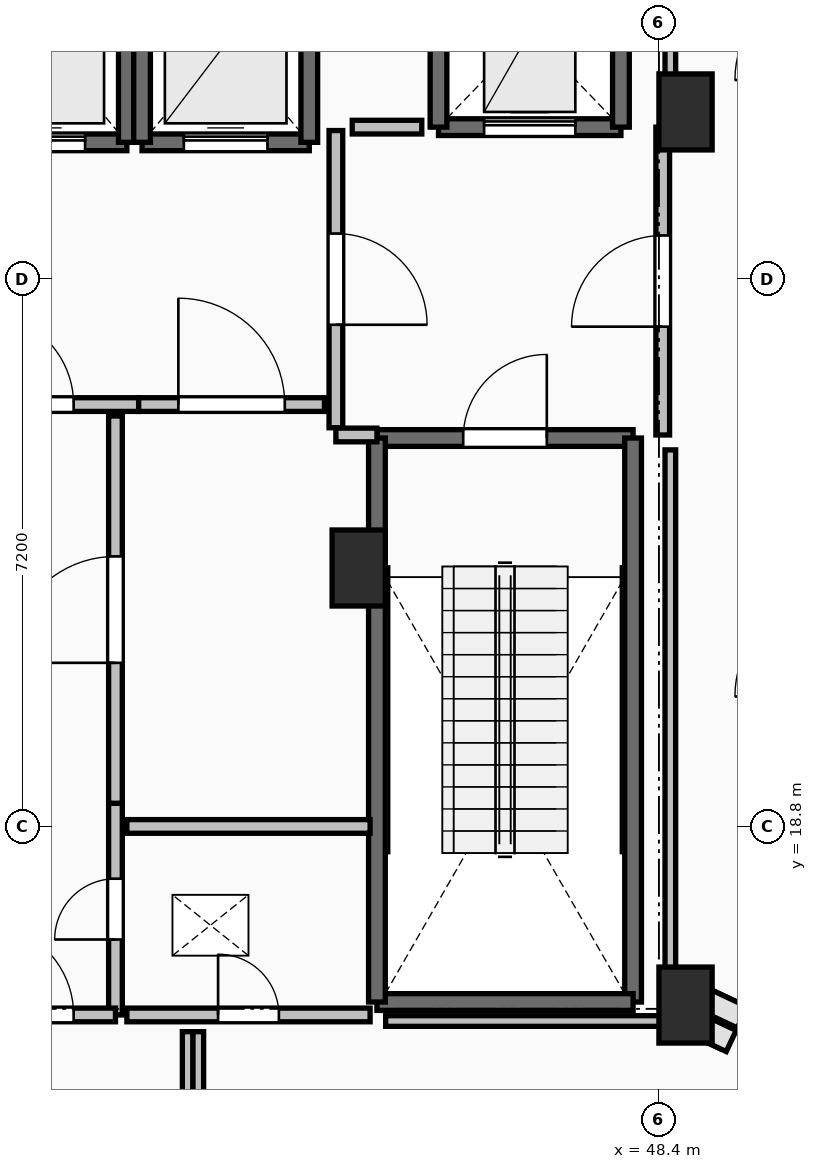
"""IFC4 building model, lengths in metres.
Left out: names, types, materials, properties, quantities, classifications, styles, units other than length and angle.
Written with IfcOpenShell. Run it as: python <this file> out.ifc"""

import sys

from ifc_helpers import new_model, si_unit, direction, frame, frame_2d, origin, origin_2d, place, context, subcontext, project, spatial, rectangle, extrude, element, fill, save


model = new_model("IFC4")
c1 = context("Model", 3, precision=1e-05, world=origin(), true_north=direction((0.0, 1.0)))
c2 = subcontext(c1, "Body", "Model", "MODEL_VIEW")
j1 = project(units=[si_unit("LENGTHUNIT", "METRE"), si_unit("PLANEANGLEUNIT", "RADIAN")], contexts=[c1])
p1 = place(None, origin())
s1 = spatial("IfcSite", under=j1, at=p1, CompositionType="ELEMENT")
p2 = place(p1, origin())
s2 = spatial("IfcBuilding", under=s1, at=p2, CompositionType="ELEMENT")
p3 = place(p2, frame((0.0, 0.0, 224.95)))
s3 = spatial("IfcBuildingStorey", under=s2, at=p3, CompositionType="ELEMENT", Elevation=224.95)
for number, where, z_axis, x_axis in (
    (1, (48.75, 28.2, 0.0), (0.0, 0.0, 1.0), (1.0, 0.0, 0.0)),
    (2, (48.75, 16.45, 0.0), (0.0, 0.0, 1.0), (1.0, 0.0, 0.0)),
    (3, (44.45, 22.2, 0.0), (0.0, 0.0, 1.0), (1.0, 0.0, 0.0)),
):
    element("IfcColumn", number, at=place(p3, frame(where, z_axis=z_axis, x_axis=x_axis)), inside=s3, PredefinedType="PILASTER", context=c2, shape_type="SweptSolid", body=[
        extrude(rectangle(XDim=0.7, YDim=1.0, at=origin_2d()), origin(), (0.0, 0.0, 1.0), 4.8),
    ])
p4 = place(p3, frame((44.69, 23.91, 0.0), z_axis=(0.0, 0.0, 1.0), x_axis=(1.0, 0.0, 0.0)))
e4 = element("IfcWall", 4, at=p4, inside=s3, PredefinedType="SOLIDWALL", context=c2, shape_type="SweptSolid", body=[
    extrude(rectangle(XDim=3.37, YDim=0.22, at=frame_2d((1.685, 0.0))), origin(), (0.0, 0.0, 1.0), 4.5),
])
p5 = place(p4, frame((1.135, 0.0, 0.0)))
e5 = element("IfcOpeningElement", 5, at=p5, cuts=e4, PredefinedType="OPENING", context=c2, shape_type="SweptSolid", body=[
    extrude(rectangle(XDim=1.1, YDim=2.15, at=frame_2d((0.55, 1.075))), frame((0.0, 0.125, 0.0), z_axis=(0.0, -1.0, 0.0), x_axis=(1.0, 0.0, 0.0)), (0.0, 0.0, 1.0), 0.25),
])
p6 = place(p3, frame((48.06, 23.91, 0.0), z_axis=(0.0, 0.0, 1.0), x_axis=(0.0, -1.0, 0.0)))
e6 = element("IfcWall", 6, at=p6, inside=s3, PredefinedType="SOLIDWALL", context=c2, shape_type="SweptSolid", body=[
    extrude(rectangle(XDim=7.42, YDim=0.22, at=frame_2d((3.71, 0.0))), origin(), (0.0, 0.0, 1.0), 4.5),
])
p7 = place(p3, frame((48.06, 16.49, 0.0), z_axis=(0.0, 0.0, 1.0), x_axis=(-1.0, 0.0, 0.0)))
e7 = element("IfcWall", 7, at=p7, inside=s3, PredefinedType="SOLIDWALL", context=c2, shape_type="SweptSolid", body=[
    extrude(rectangle(XDim=3.37, YDim=0.22, at=frame_2d((1.685, 0.0))), origin(), (0.0, 0.0, 1.0), 4.5),
])
p8 = place(p3, frame((44.69, 16.49, 0.0), z_axis=(0.0, 0.0, 1.0), x_axis=(0.0, 1.0, 0.0)))
e8 = element("IfcWall", 8, at=p8, inside=s3, PredefinedType="SOLIDWALL", context=c2, shape_type="SweptSolid", body=[
    extrude(rectangle(XDim=7.42, YDim=0.22, at=frame_2d((3.71, 0.0))), origin(), (0.0, 0.0, 1.0), 4.5),
])
p9 = place(p3, frame((39.2, 27.8, 0.0), z_axis=(0.0, 0.0, 1.0), x_axis=(1.0, 0.0, 0.0)))
e9 = element("IfcWall", 9, at=p9, inside=s3, PredefinedType="SOLIDWALL", context=c2, shape_type="SweptSolid", body=[
    extrude(rectangle(XDim=2.2, YDim=0.22, at=frame_2d((1.1, 0.0))), origin(), (0.0, 0.0, 1.0), 4.5),
])
p10 = place(p9, frame((0.55, 0.0, 0.0)))
e10 = element("IfcOpeningElement", 10, at=p10, cuts=e9, PredefinedType="OPENING", context=c2, shape_type="SweptSolid", body=[
    extrude(rectangle(XDim=1.1, YDim=2.2, at=frame_2d((0.55, 1.1))), frame((0.0, 0.125, 0.0), z_axis=(0.0, -1.0, 0.0), x_axis=(1.0, 0.0, 0.0)), (0.0, 0.0, 1.0), 0.25),
])
p11 = place(p3, frame((41.4, 27.8, 0.0), z_axis=(0.0, 0.0, 1.0), x_axis=(0.0, 1.0, 0.0)))
e11 = element("IfcWall", 11, at=p11, inside=s3, PredefinedType="SOLIDWALL", context=c2, shape_type="SweptSolid", body=[
    extrude(rectangle(XDim=2.6, YDim=0.22, at=frame_2d((1.3, 0.0))), origin(), (0.0, 0.0, 1.0), 4.5),
])
p12 = place(p3, frame((41.6, 27.8, 0.0), z_axis=(0.0, 0.0, 1.0), x_axis=(1.0, 0.0, 0.0)))
e12 = element("IfcWall", 12, at=p12, inside=s3, PredefinedType="SOLIDWALL", context=c2, shape_type="SweptSolid", body=[
    extrude(rectangle(XDim=2.2, YDim=0.22, at=frame_2d((1.1, 0.0))), origin(), (0.0, 0.0, 1.0), 4.5),
])
p13 = place(p12, frame((0.55, 0.0, 0.0)))
e13 = element("IfcOpeningElement", 13, at=p13, cuts=e12, PredefinedType="OPENING", context=c2, shape_type="SweptSolid", body=[
    extrude(rectangle(XDim=1.1, YDim=2.2, at=frame_2d((0.55, 1.1))), frame((0.0, 0.125, 0.0), z_axis=(0.0, -1.0, 0.0), x_axis=(1.0, 0.0, 0.0)), (0.0, 0.0, 1.0), 0.25),
])
for number, where, z_axis, x_axis in (
    (14, (43.8, 27.8, 0.0), (0.0, 0.0, 1.0), (0.0, 1.0, 0.0)),
    (15, (41.6, 30.4, 0.0), (0.0, 0.0, 1.0), (0.0, -1.0, 0.0)),
):
    element("IfcWall", number, at=place(p3, frame(where, z_axis=z_axis, x_axis=x_axis)), inside=s3, PredefinedType="SOLIDWALL", context=c2, shape_type="SweptSolid", body=[
        extrude(rectangle(XDim=2.6, YDim=0.22, at=frame_2d((1.3, 0.0))), origin(), (0.0, 0.0, 1.0), 4.5),
    ])
p14 = place(p3, frame((45.5, 28.0, 0.0), z_axis=(0.0, 0.0, 1.0), x_axis=(1.0, 0.0, 0.0)))
e16 = element("IfcWall", 16, at=p14, inside=s3, PredefinedType="SHEAR", context=c2, shape_type="SweptSolid", body=[
    extrude(rectangle(XDim=2.4, YDim=0.22, at=frame_2d((1.2, 0.0))), origin(), (0.0, 0.0, 1.0), 4.5),
])
p15 = place(p14, frame((0.6, 0.0, 0.0)))
e17 = element("IfcOpeningElement", 17, at=p15, cuts=e16, PredefinedType="OPENING", context=c2, shape_type="SweptSolid", body=[
    extrude(rectangle(XDim=1.2, YDim=2.2, at=frame_2d((0.6, 1.1))), frame((0.0, 0.125, 0.0), z_axis=(0.0, -1.0, 0.0), x_axis=(1.0, 0.0, 0.0)), (0.0, 0.0, 1.0), 0.25),
])
for number, where, z_axis, x_axis in (
    (18, (47.9, 28.0, 0.0), (0.0, 0.0, 1.0), (0.0, 1.0, 0.0)),
    (19, (45.5, 30.5, 0.0), (0.0, 0.0, 1.0), (0.0, -1.0, 0.0)),
):
    element("IfcWall", number, at=place(p3, frame(where, z_axis=z_axis, x_axis=x_axis)), inside=s3, PredefinedType="SHEAR", context=c2, shape_type="SweptSolid", body=[
        extrude(rectangle(XDim=2.5, YDim=0.22, at=frame_2d((1.25, 0.0))), origin(), (0.0, 0.0, 1.0), 4.5),
    ])
p16 = place(p3, frame((44.15, 27.955, 0.0), z_axis=(0.0, 0.0, 1.0), x_axis=(0.0, -1.0, 0.0)))
e20 = element("IfcWall", 20, at=p16, inside=s3, PredefinedType="PARTITIONING", context=c2, shape_type="SweptSolid", body=[
    extrude(rectangle(XDim=3.91, YDim=0.18, at=frame_2d((1.955, 0.0))), origin(), (0.0, 0.0, 1.0), 4.5),
])
p17 = place(p16, frame((1.355, 0.0, 0.0)))
e21 = element("IfcOpeningElement", 21, at=p17, cuts=e20, PredefinedType="OPENING", context=c2, shape_type="SweptSolid", body=[
    extrude(rectangle(XDim=1.2, YDim=2.15, at=frame_2d((0.6, 1.075))), frame((0.0, 0.105, 0.0), z_axis=(0.0, -1.0, 0.0), x_axis=(1.0, 0.0, 0.0)), (0.0, 0.0, 1.0), 0.21),
])
p18 = place(p3, frame((44.15, 23.95, 0.0), z_axis=(0.0, 0.0, 1.0), x_axis=(1.0, 0.0, 0.0)))
e22 = element("IfcWall", 22, at=p18, inside=s3, PredefinedType="PARTITIONING", context=c2, shape_type="SweptSolid", body=[
    extrude(rectangle(XDim=0.54, YDim=0.18, at=frame_2d((0.27, 0.0))), origin(), (0.0, 0.0, 1.0), 4.5),
])
p19 = place(p3, frame((48.45, 23.95, 0.0), z_axis=(0.0, 0.0, 1.0), x_axis=(0.0, 1.0, 0.0)))
e23 = element("IfcWall", 23, at=p19, inside=s3, PredefinedType="PARTITIONING", context=c2, shape_type="SweptSolid", body=[
    extrude(rectangle(XDim=4.05, YDim=0.18, at=frame_2d((2.025, 0.0))), origin(), (0.0, 0.0, 1.0), 3.482),
])
p20 = place(p19, frame((1.425, 0.0, 0.0)))
e24 = element("IfcOpeningElement", 24, at=p20, cuts=e23, PredefinedType="OPENING", context=c2, shape_type="SweptSolid", body=[
    extrude(rectangle(XDim=1.2, YDim=2.15, at=frame_2d((0.6, 1.075))), frame((0.0, 0.105, 0.0), z_axis=(0.0, -1.0, 0.0), x_axis=(1.0, 0.0, 0.0)), (0.0, 0.0, 1.0), 0.21),
])
p21 = place(p3, frame((38.645, 24.35, 0.0), z_axis=(0.0, 0.0, 1.0), x_axis=(1.0, 0.0, 0.0)))
e25 = element("IfcWall", 25, at=p21, inside=s3, PredefinedType="PARTITIONING", context=c2, shape_type="SweptSolid", body=[
    extrude(rectangle(XDim=2.91, YDim=0.18, at=frame_2d((1.455, 0.0))), origin(), (0.0, 0.0, 1.0), 4.5),
])
p22 = place(p21, frame((0.855, 0.0, 0.0)))
e26 = element("IfcOpeningElement", 26, at=p22, cuts=e25, PredefinedType="OPENING", context=c2, shape_type="SweptSolid", body=[
    extrude(rectangle(XDim=1.2, YDim=2.15, at=frame_2d((0.6, 1.075))), frame((0.0, 0.105, 0.0), z_axis=(0.0, -1.0, 0.0), x_axis=(1.0, 0.0, 0.0)), (0.0, 0.0, 1.0), 0.21),
])
p23 = place(p3, frame((41.555, 24.35, 0.0), z_axis=(0.0, 0.0, 1.0), x_axis=(1.0, 0.0, 0.0)))
e27 = element("IfcWall", 27, at=p23, inside=s3, PredefinedType="PARTITIONING", context=c2, shape_type="SweptSolid", body=[
    extrude(rectangle(XDim=2.445, YDim=0.18, at=frame_2d((1.223, 0.0))), origin(), (0.0, 0.0, 1.0), 4.5),
])
p24 = place(p23, frame((0.522, 0.0, 0.0)))
e28 = element("IfcOpeningElement", 28, at=p24, cuts=e27, PredefinedType="OPENING", context=c2, shape_type="SweptSolid", body=[
    extrude(rectangle(XDim=1.4, YDim=2.2, at=frame_2d((0.7, 1.1))), frame((0.0, 0.105, 0.0), z_axis=(0.0, -1.0, 0.0), x_axis=(1.0, 0.0, 0.0)), (0.0, 0.0, 1.0), 0.21),
])
p25 = place(p3, frame((41.25, 16.32, 0.0), z_axis=(0.0, 0.0, 1.0), x_axis=(0.0, 1.0, 0.0)))
e29 = element("IfcWall", 29, at=p25, inside=s3, PredefinedType="PARTITIONING", context=c2, shape_type="SweptSolid", body=[
    extrude(rectangle(XDim=2.785, YDim=0.18, at=frame_2d((1.393, 0.0))), origin(), (0.0, 0.0, 1.0), 4.5),
])
p26 = place(p25, frame((0.992, 0.0, 0.0)))
e30 = element("IfcOpeningElement", 30, at=p26, cuts=e29, PredefinedType="OPENING", context=c2, shape_type="SweptSolid", body=[
    extrude(rectangle(XDim=0.8, YDim=2.05, at=frame_2d((0.4, 1.025))), frame((0.0, 0.105, 0.0), z_axis=(0.0, -1.0, 0.0), x_axis=(1.0, 0.0, 0.0)), (0.0, 0.0, 1.0), 0.21),
])
p27 = place(p3, frame((41.25, 19.105, 0.0), z_axis=(0.0, 0.0, 1.0), x_axis=(0.0, 1.0, 0.0)))
e31 = element("IfcWall", 31, at=p27, inside=s3, PredefinedType="PARTITIONING", context=c2, shape_type="SweptSolid", body=[
    extrude(rectangle(XDim=5.095, YDim=0.18, at=frame_2d((2.547, 0.0))), origin(), (0.0, 0.0, 1.0), 3.482),
])
p28 = place(p27, frame((1.847, 0.0, 0.0)))
e32 = element("IfcOpeningElement", 32, at=p28, cuts=e31, PredefinedType="OPENING", context=c2, shape_type="SweptSolid", body=[
    extrude(rectangle(XDim=1.4, YDim=2.2, at=frame_2d((0.7, 1.1))), frame((0.0, 0.105, 0.0), z_axis=(0.0, -1.0, 0.0), x_axis=(1.0, 0.0, 0.0)), (0.0, 0.0, 1.0), 0.21),
])
p29 = place(p3, frame((38.95, 16.32, 0.0), z_axis=(0.0, 0.0, 1.0), x_axis=(1.0, 0.0, 0.0)))
e33 = element("IfcWall", 33, at=p29, inside=s3, PredefinedType="PARTITIONING", context=c2, shape_type="SweptSolid", body=[
    extrude(rectangle(XDim=2.3, YDim=0.18, at=frame_2d((1.15, 0.0))), origin(), (0.0, 0.0, 1.0), 4.5),
])
p30 = place(p29, frame((0.55, 0.0, 0.0)))
e34 = element("IfcOpeningElement", 34, at=p30, cuts=e33, PredefinedType="OPENING", context=c2, shape_type="SweptSolid", body=[
    extrude(rectangle(XDim=1.2, YDim=2.15, at=frame_2d((0.6, 1.075))), frame((0.0, 0.105, 0.0), z_axis=(0.0, -1.0, 0.0), x_axis=(1.0, 0.0, 0.0)), (0.0, 0.0, 1.0), 0.21),
])
p31 = place(p3, frame((44.6, 18.8, 0.0), z_axis=(0.0, 0.0, 1.0), x_axis=(-1.0, 0.0, 0.0)))
e35 = element("IfcWall", 35, at=p31, inside=s3, PredefinedType="PARTITIONING", context=c2, shape_type="SweptSolid", body=[
    extrude(rectangle(XDim=3.2, YDim=0.18, at=frame_2d((1.6, 0.0))), origin(), (0.0, 0.0, 1.0), 4.5),
])
p32 = place(p3, frame((41.4, 16.32, 0.0), z_axis=(0.0, 0.0, 1.0), x_axis=(1.0, 0.0, 0.0)))
e36 = element("IfcWall", 36, at=p32, inside=s3, PredefinedType="PARTITIONING", context=c2, shape_type="SweptSolid", body=[
    extrude(rectangle(XDim=3.2, YDim=0.18, at=frame_2d((1.6, 0.0))), origin(), (0.0, 0.0, 1.0), 4.5),
])
p33 = place(p32, frame((1.2, 0.0, 0.0)))
e37 = element("IfcOpeningElement", 37, at=p33, cuts=e36, PredefinedType="OPENING", context=c2, shape_type="SweptSolid", body=[
    extrude(rectangle(XDim=0.8, YDim=2.05, at=frame_2d((0.4, 1.025))), frame((0.0, 0.105, 0.0), z_axis=(0.0, -1.0, 0.0), x_axis=(1.0, 0.0, 0.0)), (0.0, 0.0, 1.0), 0.21),
])
p34 = place(p3, frame((45.28, 28.0, 0.0), z_axis=(0.0, 0.0, 1.0), x_axis=(-1.0, 0.0, 0.0)))
e38 = element("IfcWall", 38, at=p34, inside=s3, PredefinedType="PARTITIONING", context=c2, shape_type="SweptSolid", body=[
    extrude(rectangle(XDim=0.915, YDim=0.18, at=frame_2d((0.458, 0.0))), origin(), (0.0, 0.0, 1.0), 4.5),
])
for number, where, z_axis, x_axis in (
    (39, (42.2, 16.1, 0.0), (0.0, 0.0, 1.0), (0.0, -1.0, 0.0)),
    (40, (42.34, 14.27, 0.0), (0.0, 0.0, 1.0), (0.0, 1.0, 0.0)),
):
    element("IfcWall", number, at=place(p3, frame(where, z_axis=z_axis, x_axis=x_axis)), inside=s3, PredefinedType="PARTITIONING", context=c2, shape_type="SweptSolid", body=[
        extrude(rectangle(XDim=1.83, YDim=0.14, at=frame_2d((0.915, 0.0))), origin(), (0.0, 0.0, 1.0), 4.5),
    ])
p35 = place(p3, frame((44.805, 16.24, 0.0), z_axis=(0.0, 0.0, 1.0), x_axis=(1.0, 0.0, 0.0)))
e41 = element("IfcWall", 41, at=p35, inside=s3, PredefinedType="PARTITIONING", context=c2, shape_type="SweptSolid", body=[
    extrude(rectangle(XDim=3.745, YDim=0.14, at=frame_2d((1.873, 0.0))), origin(), (0.0, 0.0, 1.0), 3.482),
])
p36 = place(p3, frame((48.55, 16.24, 0.0), z_axis=(0.0, 0.0, 1.0), x_axis=(0.0, 1.0, 0.0)))
e42 = element("IfcWall", 42, at=p36, inside=s3, PredefinedType="PARTITIONING", context=c2, shape_type="SweptSolid", body=[
    extrude(rectangle(XDim=7.514, YDim=0.14, at=frame_2d((3.757, 0.0))), origin(), (0.0, 0.0, 1.0), 3.482),
])
p37 = place(p3, frame((48.55, 28.196, 0.0), z_axis=(0.0, 0.0, 1.0), x_axis=(0.0, 1.0, 0.0)))
e43 = element("IfcWall", 43, at=p37, inside=s3, PredefinedType="PARTITIONING", context=c2, shape_type="SweptSolid", body=[
    extrude(rectangle(XDim=5.254, YDim=0.14, at=frame_2d((2.627, 0.0))), origin(), (0.0, 0.0, 1.0), 3.482),
])
p38 = place(p5, origin())
e44 = element("IfcDoor", 44, at=p38, inside=s3, OperationType="SINGLE_SWING_RIGHT", PredefinedType="DOOR", context=c2, shape_type="SweptSolid", body=[
    extrude(rectangle(XDim=1.1, YDim=2.15, at=frame_2d((0.55, 1.075))), frame((0.0, 0.025, 0.0), z_axis=(0.0, -1.0, 0.0), x_axis=(1.0, 0.0, 0.0)), (0.0, 0.0, 1.0), 0.05),
])
fill(e5, e44)
p39 = place(p10, origin())
e45 = element("IfcDoor", 45, at=p39, inside=s3, OperationType="SLIDING_TO_LEFT", PredefinedType="DOOR", context=c2, shape_type="SweptSolid", body=[
    extrude(rectangle(XDim=1.1, YDim=2.2, at=frame_2d((0.55, 1.1))), frame((0.0, 0.025, 0.0), z_axis=(0.0, -1.0, 0.0), x_axis=(1.0, 0.0, 0.0)), (0.0, 0.0, 1.0), 0.05),
])
fill(e10, e45)
p40 = place(p13, origin())
e46 = element("IfcDoor", 46, at=p40, inside=s3, OperationType="SLIDING_TO_LEFT", PredefinedType="DOOR", context=c2, shape_type="SweptSolid", body=[
    extrude(rectangle(XDim=1.1, YDim=2.2, at=frame_2d((0.55, 1.1))), frame((0.0, 0.025, 0.0), z_axis=(0.0, -1.0, 0.0), x_axis=(1.0, 0.0, 0.0)), (0.0, 0.0, 1.0), 0.05),
])
fill(e13, e46)
p41 = place(p15, origin())
e47 = element("IfcDoor", 47, at=p41, inside=s3, OperationType="SLIDING_TO_LEFT", PredefinedType="DOOR", context=c2, shape_type="SweptSolid", body=[
    extrude(rectangle(XDim=1.2, YDim=2.2, at=frame_2d((0.6, 1.1))), frame((0.0, 0.025, 0.0), z_axis=(0.0, -1.0, 0.0), x_axis=(1.0, 0.0, 0.0)), (0.0, 0.0, 1.0), 0.05),
])
fill(e17, e47)
p42 = place(p17, origin())
e48 = element("IfcDoor", 48, at=p42, inside=s3, OperationType="SINGLE_SWING_RIGHT", PredefinedType="DOOR", context=c2, shape_type="SweptSolid", body=[
    extrude(rectangle(XDim=1.2, YDim=2.15, at=frame_2d((0.6, 1.075))), frame((0.0, 0.025, 0.0), z_axis=(0.0, -1.0, 0.0), x_axis=(1.0, 0.0, 0.0)), (0.0, 0.0, 1.0), 0.05),
])
fill(e21, e48)
p43 = place(p20, origin())
e49 = element("IfcDoor", 49, at=p43, inside=s3, OperationType="SINGLE_SWING_LEFT", PredefinedType="DOOR", context=c2, shape_type="SweptSolid", body=[
    extrude(rectangle(XDim=1.2, YDim=2.15, at=frame_2d((0.6, 1.075))), frame((0.0, 0.025, 0.0), z_axis=(0.0, -1.0, 0.0), x_axis=(1.0, 0.0, 0.0)), (0.0, 0.0, 1.0), 0.05),
])
fill(e24, e49)
p44 = place(p22, origin())
e50 = element("IfcDoor", 50, at=p44, inside=s3, OperationType="SINGLE_SWING_LEFT", PredefinedType="DOOR", context=c2, shape_type="SweptSolid", body=[
    extrude(rectangle(XDim=1.2, YDim=2.15, at=frame_2d((0.6, 1.075))), frame((0.0, 0.025, 0.0), z_axis=(0.0, -1.0, 0.0), x_axis=(1.0, 0.0, 0.0)), (0.0, 0.0, 1.0), 0.05),
])
fill(e26, e50)
p45 = place(p24, origin())
e51 = element("IfcDoor", 51, at=p45, inside=s3, OperationType="DOUBLE_SWING_LEFT", PredefinedType="DOOR", context=c2, shape_type="SweptSolid", body=[
    extrude(rectangle(XDim=1.4, YDim=2.2, at=frame_2d((0.7, 1.1))), frame((0.0, 0.025, 0.0), z_axis=(0.0, -1.0, 0.0), x_axis=(1.0, 0.0, 0.0)), (0.0, 0.0, 1.0), 0.05),
])
fill(e28, e51)
p46 = place(p26, origin())
e52 = element("IfcDoor", 52, at=p46, inside=s3, OperationType="SINGLE_SWING_LEFT", PredefinedType="DOOR", context=c2, shape_type="SweptSolid", body=[
    extrude(rectangle(XDim=0.8, YDim=2.05, at=frame_2d((0.4, 1.025))), frame((0.0, 0.025, 0.0), z_axis=(0.0, -1.0, 0.0), x_axis=(1.0, 0.0, 0.0)), (0.0, 0.0, 1.0), 0.05),
])
fill(e30, e52)
p47 = place(p28, origin())
e53 = element("IfcDoor", 53, at=p47, inside=s3, OperationType="DOUBLE_SWING_LEFT", PredefinedType="DOOR", context=c2, shape_type="SweptSolid", body=[
    extrude(rectangle(XDim=1.4, YDim=2.2, at=frame_2d((0.7, 1.1))), frame((0.0, 0.025, 0.0), z_axis=(0.0, -1.0, 0.0), x_axis=(1.0, 0.0, 0.0)), (0.0, 0.0, 1.0), 0.05),
])
fill(e32, e53)
p48 = place(p30, origin())
e54 = element("IfcDoor", 54, at=p48, inside=s3, OperationType="SINGLE_SWING_LEFT", PredefinedType="DOOR", context=c2, shape_type="SweptSolid", body=[
    extrude(rectangle(XDim=1.2, YDim=2.15, at=frame_2d((0.6, 1.075))), frame((0.0, 0.025, 0.0), z_axis=(0.0, -1.0, 0.0), x_axis=(1.0, 0.0, 0.0)), (0.0, 0.0, 1.0), 0.05),
])
fill(e34, e54)
p49 = place(p33, origin())
e55 = element("IfcDoor", 55, at=p49, inside=s3, OperationType="SINGLE_SWING_LEFT", PredefinedType="DOOR", context=c2, shape_type="SweptSolid", body=[
    extrude(rectangle(XDim=0.8, YDim=2.05, at=frame_2d((0.4, 1.025))), frame((0.0, 0.025, 0.0), z_axis=(0.0, -1.0, 0.0), x_axis=(1.0, 0.0, 0.0)), (0.0, 0.0, 1.0), 0.05),
])
fill(e37, e55)
save(model, sys.argv[1])
